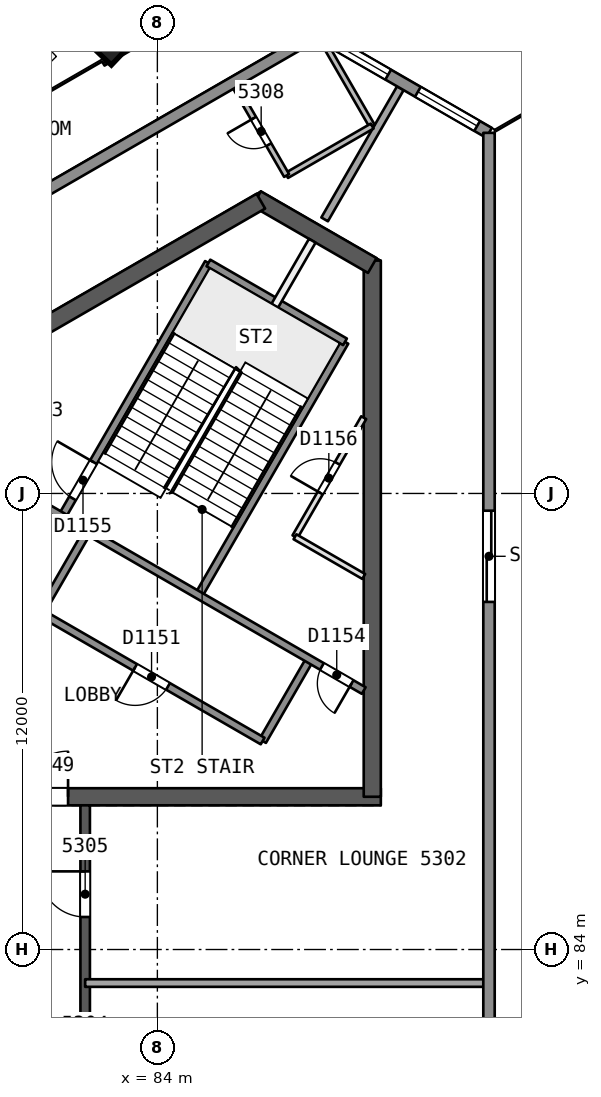
"""IFC4 building model, lengths in metres.
Left out: names, types, materials, properties, quantities, classifications, styles, units other than length and angle.
Written with IfcOpenShell. Run it as: python <this file> out.ifc"""

import sys

from ifc_helpers import new_model, si_unit, direction, frame, frame_2d, origin, origin_2d, place, context, subcontext, project, spatial, rectangle, extrude, element, fill, save


model = new_model("IFC4")
c1 = context("Model", 3, precision=1e-05, world=origin(), true_north=direction((0.0, 1.0)))
c2 = subcontext(c1, "Body", "Model", "MODEL_VIEW")
j1 = project(units=[si_unit("LENGTHUNIT", "METRE"), si_unit("PLANEANGLEUNIT", "RADIAN")], contexts=[c1])
p1 = place(None, origin())
s1 = spatial("IfcSite", under=j1, at=p1, CompositionType="ELEMENT")
p2 = place(p1, origin())
s2 = spatial("IfcBuilding", under=s1, at=p2, CompositionType="ELEMENT")
p3 = place(p2, frame((0.0, 0.0, 216.9)))
s3 = spatial("IfcBuildingStorey", under=s2, at=p3, CompositionType="ELEMENT", Elevation=216.9)
p4 = place(p3, frame((79.63, 88.019, 0.0), z_axis=(0.0, 0.0, 1.0), x_axis=(1.0, 0.0, 0.0)))
e1 = element("IfcWall", 1, at=p4, inside=s3, PredefinedType="SHEAR", context=c2, shape_type="SweptSolid", body=[
    extrude(rectangle(XDim=10.25, YDim=0.45, at=frame_2d((5.125, 0.0))), origin(), (0.0, 0.0, 1.0), 3.7),
])
p5 = place(p4, frame((0.82, 0.0, 0.0)))
e2 = element("IfcOpeningElement", 2, at=p5, cuts=e1, PredefinedType="OPENING", context=c2, shape_type="SweptSolid", body=[
    extrude(rectangle(XDim=1.2, YDim=2.1, at=frame_2d((0.6, 1.05))), frame((0.0, 0.235, 0.0), z_axis=(0.0, -1.0, 0.0), x_axis=(1.0, 0.0, 0.0)), (0.0, 0.0, 1.0), 0.471),
])
p6 = place(p3, frame((89.655, 88.019, 0.0), z_axis=(0.0, 0.0, 1.0), x_axis=(0.0, 1.0, 0.0)))
e3 = element("IfcWall", 3, at=p6, inside=s3, PredefinedType="SHEAR", context=c2, shape_type="SweptSolid", body=[
    extrude(rectangle(XDim=14.108, YDim=0.45, at=frame_2d((7.054, 0.0))), origin(), (0.0, 0.0, 1.0), 3.7),
])
p7 = place(p3, frame((89.655, 101.998, 0.0), z_axis=(0.0, 0.0, 1.0), x_axis=(-0.866042179588, 0.49997094233, 0.0)))
e4 = element("IfcWall", 4, at=p7, inside=s3, PredefinedType="SHEAR", context=c2, shape_type="SweptSolid", body=[
    extrude(rectangle(XDim=3.515, YDim=0.45, at=frame_2d((1.758, 0.0))), origin(), (0.0, 0.0, 1.0), 3.7),
])
p8 = place(p3, frame((86.723, 103.69, 0.0), z_axis=(0.0, 0.0, 1.0), x_axis=(-0.866022713978, -0.500004658852, 0.0)))
e5 = element("IfcWall", 5, at=p8, inside=s3, PredefinedType="SHEAR", context=c2, shape_type="SweptSolid", body=[
    extrude(rectangle(XDim=14.203, YDim=0.45, at=frame_2d((7.102, 0.0))), origin(), (0.0, 0.0, 1.0), 3.7),
])
p9 = place(p3, frame((82.1, 72.206, 0.0), z_axis=(0.0, 0.0, 1.0), x_axis=(0.0, 1.0, 0.0)))
e6 = element("IfcWall", 6, at=p9, inside=s3, PredefinedType="SHEAR", context=c2, shape_type="SweptSolid", body=[
    extrude(rectangle(XDim=15.588, YDim=0.25, at=frame_2d((7.794, 0.0))), origin(), (0.0, 0.0, 1.0), 3.3),
])
p10 = place(p9, frame((2.618, 0.0, 0.0)))
e7 = element("IfcOpeningElement", 7, at=p10, cuts=e6, PredefinedType="OPENING", context=c2, shape_type="SweptSolid", body=[
    extrude(rectangle(XDim=1.0, YDim=2.1, at=frame_2d((0.5, 1.05))), frame((0.0, 0.135, 0.0), z_axis=(0.0, -1.0, 0.0), x_axis=(1.0, 0.0, 0.0)), (0.0, 0.0, 1.0), 0.271),
])
p11 = place(p9, frame((7.974, 0.0, 0.0)))
e8 = element("IfcOpeningElement", 8, at=p11, cuts=e6, PredefinedType="OPENING", context=c2, shape_type="SweptSolid", body=[
    extrude(rectangle(XDim=1.2, YDim=2.4, at=frame_2d((0.6, 1.2))), frame((0.0, 0.135, 0.0), z_axis=(0.0, -1.0, 0.0), x_axis=(1.0, 0.0, 0.0)), (0.0, 0.0, 1.0), 0.271),
])
p12 = place(p9, frame((12.65, 0.0, 0.0)))
e9 = element("IfcOpeningElement", 9, at=p12, cuts=e6, PredefinedType="OPENING", context=c2, shape_type="SweptSolid", body=[
    extrude(rectangle(XDim=1.2, YDim=2.4, at=frame_2d((0.6, 1.2))), frame((0.0, 0.135, 0.0), z_axis=(0.0, -1.0, 0.0), x_axis=(1.0, 0.0, 0.0)), (0.0, 0.0, 1.0), 0.271),
])
p13 = place(p3, frame((91.743, 109.0, 0.0), z_axis=(-0.017605877014, -0.030464101799, 0.99938079409), x_axis=(0.86581098392, -0.500371202332, 2.456e-09)))
e10 = element("IfcColumn", 10, at=p13, inside=s3, PredefinedType="COLUMN", context=c2, shape_type="SweptSolid", body=[
    extrude(rectangle(XDim=1.9, YDim=1.9, at=origin_2d()), origin(), (0.0, 0.0, 1.0), 3.702),
])
p14 = place(p3, frame((82.783, 107.907, 0.0), z_axis=(-0.008375902173, -0.028161497857, 0.999568293966), x_axis=(0.865850883257, 0.499846917191, 0.021337931896)))
e11 = element("IfcColumn", 11, at=p14, inside=s3, PredefinedType="COLUMN", context=c2, shape_type="SweptSolid", body=[
    extrude(rectangle(XDim=0.85, YDim=0.85, at=origin_2d()), origin(), (0.0, 0.0, 1.0), 3.702),
])
p15 = place(p3, frame((92.578, 83.118, 0.0), z_axis=(0.0, 0.0, 1.0), x_axis=(-1.0, 0.0, 0.0)))
e12 = element("IfcWall", 12, at=p15, inside=s3, PredefinedType="PARTITIONING", context=c2, shape_type="SweptSolid", body=[
    extrude(rectangle(XDim=10.478, YDim=0.2, at=frame_2d((5.239, 0.0))), origin(), (0.0, 0.0, 1.0), 3.3),
])
p16 = place(p3, frame((90.394, 106.663, 0.0), z_axis=(0.0, 0.0, 1.0), x_axis=(-0.49999285859, -0.86602952684, 0.0)))
e13 = element("IfcWall", 13, at=p16, inside=s3, PredefinedType="PARTITIONING", context=c2, shape_type="SweptSolid", body=[
    extrude(rectangle(XDim=3.986, YDim=0.2, at=frame_2d((1.993, 0.0))), origin(), (0.0, 0.0, 1.0), 3.3),
])
p17 = place(p3, frame((88.418, 107.804, 0.0), z_axis=(0.0, 0.0, 1.0), x_axis=(0.500010657777, -0.866019250426, 0.0)))
e14 = element("IfcWall", 14, at=p17, inside=s3, PredefinedType="PARTITIONING", context=c2, shape_type="SweptSolid", body=[
    extrude(rectangle(XDim=2.469, YDim=0.15, at=frame_2d((1.234, 0.0))), origin(), (0.0, 0.0, 1.0), 3.3),
])
p18 = place(p3, frame((89.652, 105.666, 0.0), z_axis=(0.0, 0.0, 1.0), x_axis=(-0.866021400173, -0.500006934395, 0.0)))
e15 = element("IfcWall", 15, at=p18, inside=s3, PredefinedType="PARTITIONING", context=c2, shape_type="SweptSolid", body=[
    extrude(rectangle(XDim=2.6, YDim=0.15, at=frame_2d((1.3, 0.0))), origin(), (0.0, 0.0, 1.0), 3.3),
])
p19 = place(p3, frame((87.4, 104.366, 0.0), z_axis=(0.0, 0.0, 1.0), x_axis=(-0.500014634633, 0.86601695431, 0.0)))
e16 = element("IfcWall", 16, at=p19, inside=s3, PredefinedType="PARTITIONING", context=c2, shape_type="SweptSolid", body=[
    extrude(rectangle(XDim=2.676, YDim=0.15, at=frame_2d((1.338, 0.0))), origin(), (0.0, 0.0, 1.0), 3.3),
])
p20 = place(p19, frame((0.938, 0.0, 0.0)))
e17 = element("IfcOpeningElement", 17, at=p20, cuts=e16, PredefinedType="OPENING", context=c2, shape_type="SweptSolid", body=[
    extrude(rectangle(XDim=0.8, YDim=2.1, at=frame_2d((0.4, 1.05))), frame((0.0, 0.085, 0.0), z_axis=(0.0, -1.0, 0.0), x_axis=(1.0, 0.0, 0.0)), (0.0, 0.0, 1.0), 0.171),
])
p21 = place(p3, frame((88.21, 108.096, 0.0), z_axis=(0.0, 0.0, 1.0), x_axis=(0.866045268016, -0.499965592563, 0.0)))
e18 = element("IfcWall", 18, at=p21, inside=s3, PredefinedType="SOLIDWALL", context=c2, shape_type="SweptSolid", body=[
    extrude(rectangle(XDim=5.215, YDim=0.3, at=frame_2d((2.607, 0.0))), origin(), (0.0, 0.0, 1.0), 3.3),
])
p22 = place(p21, frame((3.054, 0.0, 0.9)))
e19 = element("IfcOpeningElement", 19, at=p22, cuts=e18, PredefinedType="OPENING", context=c2, shape_type="SweptSolid", body=[
    extrude(rectangle(XDim=1.8, YDim=1.5, at=frame_2d((0.9, 0.75))), frame((0.0, 0.161, 0.0), z_axis=(0.0, -1.0, 0.0), x_axis=(1.0, 0.0, 0.0)), (0.0, 0.0, 1.0), 0.321),
])
p23 = place(p21, frame((0.351, 0.0, 0.9)))
e20 = element("IfcOpeningElement", 20, at=p23, cuts=e18, PredefinedType="OPENING", context=c2, shape_type="SweptSolid", body=[
    extrude(rectangle(XDim=1.8, YDim=1.5, at=frame_2d((0.9, 0.75))), frame((0.0, 0.161, 0.0), z_axis=(0.0, -1.0, 0.0), x_axis=(1.0, 0.0, 0.0)), (0.0, 0.0, 1.0), 0.321),
])
p24 = place(p3, frame((92.727, 105.489, 0.0), z_axis=(0.0, 0.0, 1.0), x_axis=(0.0, -1.0, 0.0)))
e21 = element("IfcWall", 21, at=p24, inside=s3, PredefinedType="SOLIDWALL", context=c2, shape_type="SweptSolid", body=[
    extrude(rectangle(XDim=50.977, YDim=0.3, at=frame_2d((25.489, 0.0))), origin(), (0.0, 0.0, 1.0), 3.3),
])
p25 = place(p24, frame((9.942, 0.0, 0.0)))
e22 = element("IfcOpeningElement", 22, at=p25, cuts=e21, PredefinedType="OPENING", context=c2, shape_type="SweptSolid", body=[
    extrude(rectangle(XDim=2.4, YDim=2.4, at=frame_2d((1.2, 1.2))), frame((0.0, 0.161, 0.0), z_axis=(0.0, -1.0, 0.0), x_axis=(1.0, 0.0, 0.0)), (0.0, 0.0, 1.0), 0.321),
])
p26 = place(p24, frame((28.965, 0.0, 0.0)))
e23 = element("IfcOpeningElement", 23, at=p26, cuts=e21, PredefinedType="OPENING", context=c2, shape_type="SweptSolid", body=[
    extrude(rectangle(XDim=2.4, YDim=2.4, at=frame_2d((1.2, 1.2))), frame((0.0, 0.161, 0.0), z_axis=(0.0, -1.0, 0.0), x_axis=(1.0, 0.0, 0.0)), (0.0, 0.0, 1.0), 0.321),
])
p27 = place(p24, frame((39.656, 0.0, 0.0)))
e24 = element("IfcOpeningElement", 24, at=p27, cuts=e21, PredefinedType="OPENING", context=c2, shape_type="SweptSolid", body=[
    extrude(rectangle(XDim=2.4, YDim=2.4, at=frame_2d((1.2, 1.2))), frame((0.0, 0.161, 0.0), z_axis=(0.0, -1.0, 0.0), x_axis=(1.0, 0.0, 0.0)), (0.0, 0.0, 1.0), 0.321),
])
p28 = place(p24, frame((23.509, 0.0, 0.0)))
e25 = element("IfcOpeningElement", 25, at=p28, cuts=e21, PredefinedType="OPENING", context=c2, shape_type="SweptSolid", body=[
    extrude(rectangle(XDim=2.4, YDim=2.4, at=frame_2d((1.2, 1.2))), frame((0.0, 0.161, 0.0), z_axis=(0.0, -1.0, 0.0), x_axis=(1.0, 0.0, 0.0)), (0.0, 0.0, 1.0), 0.321),
])
p29 = place(p3, frame((44.063, 82.607, 0.0), z_axis=(0.0, 0.0, 1.0), x_axis=(0.866024402399, 0.500001734447, 0.0)))
e26 = element("IfcWall", 26, at=p29, inside=s3, PredefinedType="SOLIDWALL", context=c2, shape_type="SweptSolid", body=[
    extrude(rectangle(XDim=50.977, YDim=0.3, at=frame_2d((25.488, 0.0))), origin(), (0.0, 0.0, 1.0), 3.3),
])
p30 = place(p29, frame((24.444, 0.0, 0.0)))
e27 = element("IfcOpeningElement", 27, at=p30, cuts=e26, PredefinedType="OPENING", context=c2, shape_type="SweptSolid", body=[
    extrude(rectangle(XDim=2.4, YDim=2.4, at=frame_2d((1.2, 1.2))), frame((0.0, 0.161, 0.0), z_axis=(0.0, -1.0, 0.0), x_axis=(1.0, 0.0, 0.0)), (0.0, 0.0, 1.0), 0.321),
])
p31 = place(p29, frame((29.121, 0.0, 0.0)))
e28 = element("IfcOpeningElement", 28, at=p31, cuts=e26, PredefinedType="OPENING", context=c2, shape_type="SweptSolid", body=[
    extrude(rectangle(XDim=2.4, YDim=2.4, at=frame_2d((1.2, 1.2))), frame((0.0, 0.161, 0.0), z_axis=(0.0, -1.0, 0.0), x_axis=(1.0, 0.0, 0.0)), (0.0, 0.0, 1.0), 0.321),
])
p32 = place(p29, frame((39.656, 0.0, 0.0)))
e29 = element("IfcOpeningElement", 29, at=p32, cuts=e26, PredefinedType="OPENING", context=c2, shape_type="SweptSolid", body=[
    extrude(rectangle(XDim=2.4, YDim=2.4, at=frame_2d((1.2, 1.2))), frame((0.0, 0.161, 0.0), z_axis=(0.0, -1.0, 0.0), x_axis=(1.0, 0.0, 0.0)), (0.0, 0.0, 1.0), 0.321),
])
p33 = place(p29, frame((19.612, 0.0, 0.0)))
e30 = element("IfcOpeningElement", 30, at=p33, cuts=e26, PredefinedType="OPENING", context=c2, shape_type="SweptSolid", body=[
    extrude(rectangle(XDim=2.4, YDim=2.4, at=frame_2d((1.2, 1.2))), frame((0.0, 0.161, 0.0), z_axis=(0.0, -1.0, 0.0), x_axis=(1.0, 0.0, 0.0)), (0.0, 0.0, 1.0), 0.321),
])
p34 = place(p29, frame((8.885, 0.0, 0.0)))
e31 = element("IfcOpeningElement", 31, at=p34, cuts=e26, PredefinedType="OPENING", context=c2, shape_type="SweptSolid", body=[
    extrude(rectangle(XDim=2.4, YDim=2.4, at=frame_2d((1.2, 1.2))), frame((0.0, 0.161, 0.0), z_axis=(0.0, -1.0, 0.0), x_axis=(1.0, 0.0, 0.0)), (0.0, 0.0, 1.0), 0.321),
])
p35 = place(p3, frame((86.77, 89.486, 0.0), z_axis=(0.0, 0.0, 1.0), x_axis=(0.499961042966, 0.86604789447, 0.0)))
e32 = element("IfcWall", 32, at=p35, inside=s3, PredefinedType="SOLIDWALL", context=c2, shape_type="SweptSolid", body=[
    extrude(rectangle(XDim=2.48, YDim=0.2, at=frame_2d((1.24, 0.0))), origin(), (0.0, 0.0, 1.0), 3.3),
])
p36 = place(p3, frame((87.621, 94.86, 0.0), z_axis=(0.0, 0.0, 1.0), x_axis=(0.499993116331, 0.866029378036, 0.0)))
e33 = element("IfcWall", 33, at=p36, inside=s3, PredefinedType="PARTITIONING", context=c2, shape_type="SweptSolid", body=[
    extrude(rectangle(XDim=3.618, YDim=0.15, at=frame_2d((1.809, 0.0))), origin(), (0.0, 0.0, 1.0), 3.3),
])
p37 = place(p36, frame((1.332, 0.0, 0.0)))
e34 = element("IfcOpeningElement", 34, at=p37, cuts=e33, PredefinedType="OPENING", context=c2, shape_type="SweptSolid", body=[
    extrude(rectangle(XDim=0.9, YDim=2.1, at=frame_2d((0.45, 1.05))), frame((0.0, 0.085, 0.0), z_axis=(0.0, -1.0, 0.0), x_axis=(1.0, 0.0, 0.0)), (0.0, 0.0, 1.0), 0.171),
])
p38 = place(p3, frame((85.087, 93.321, 0.0), z_axis=(0.0, 0.0, 1.0), x_axis=(0.500019787375, 0.866013979237, 0.0)))
e35 = element("IfcWall", 35, at=p38, inside=s3, PredefinedType="SOLIDWALL", context=c2, shape_type="SweptSolid", body=[
    extrude(rectangle(XDim=7.7, YDim=0.2, at=frame_2d((3.85, 0.0))), origin(), (0.0, 0.0, 1.0), 3.3),
])
p39 = place(p3, frame((87.09, 100.94, 0.0), z_axis=(0.0, 0.0, 1.0), x_axis=(0.500011643316, 0.866018681408, 0.0)))
e36 = element("IfcWall", 36, at=p39, inside=s3, PredefinedType="PARTITIONING", context=c2, shape_type="SweptSolid", body=[
    extrude(rectangle(XDim=1.973, YDim=0.2, at=frame_2d((0.987, 0.0))), origin(), (0.0, 0.0, 1.0), 3.3),
])
p40 = place(p3, frame((80.924, 92.861, 0.0), z_axis=(0.0, 0.0, 1.0), x_axis=(0.499961042966, 0.86604789447, 0.0)))
e37 = element("IfcWall", 37, at=p40, inside=s3, PredefinedType="SOLIDWALL", context=c2, shape_type="SweptSolid", body=[
    extrude(rectangle(XDim=2.48, YDim=0.2, at=frame_2d((1.24, 0.0))), origin(), (0.0, 0.0, 1.0), 3.3),
])
p41 = place(p3, frame((81.493, 95.396, 0.0), z_axis=(0.0, 0.0, 1.0), x_axis=(0.500006057782, 0.866021906294, 0.0)))
e38 = element("IfcWall", 38, at=p41, inside=s3, PredefinedType="SOLIDWALL", context=c2, shape_type="SweptSolid", body=[
    extrude(rectangle(XDim=7.7, YDim=0.2, at=frame_2d((3.85, 0.0))), origin(), (0.0, 0.0, 1.0), 3.3),
])
p42 = place(p41, frame((0.55, 0.0, 0.0)))
e39 = element("IfcOpeningElement", 39, at=p42, cuts=e38, PredefinedType="OPENING", context=c2, shape_type="SweptSolid", body=[
    extrude(rectangle(XDim=1.1, YDim=2.1, at=frame_2d((0.55, 1.05))), frame((0.0, 0.11, 0.0), z_axis=(0.0, -1.0, 0.0), x_axis=(1.0, 0.0, 0.0)), (0.0, 0.0, 1.0), 0.221),
])
p43 = place(p3, frame((86.77, 89.486, 0.0), z_axis=(0.0, 0.0, 1.0), x_axis=(-0.86601811187, 0.500012629753, 0.0)))
e40 = element("IfcWall", 40, at=p43, inside=s3, PredefinedType="SOLIDWALL", context=c2, shape_type="SweptSolid", body=[
    extrude(rectangle(XDim=10.9, YDim=0.2, at=frame_2d((5.45, 0.0))), origin(), (0.0, 0.0, 1.0), 3.3),
])
p44 = place(p43, frame((2.875, 0.0, 0.0)))
e41 = element("IfcOpeningElement", 41, at=p44, cuts=e40, PredefinedType="OPENING", context=c2, shape_type="SweptSolid", body=[
    extrude(rectangle(XDim=1.0, YDim=2.1, at=frame_2d((0.5, 1.05))), frame((0.0, 0.11, 0.0), z_axis=(0.0, -1.0, 0.0), x_axis=(1.0, 0.0, 0.0)), (0.0, 0.0, 1.0), 0.221),
])
p45 = place(p43, frame((7.375, 0.0, 0.0)))
e42 = element("IfcOpeningElement", 42, at=p45, cuts=e40, PredefinedType="OPENING", context=c2, shape_type="SweptSolid", body=[
    extrude(rectangle(XDim=1.0, YDim=2.1, at=frame_2d((0.5, 1.05))), frame((0.0, 0.11, 0.0), z_axis=(0.0, -1.0, 0.0), x_axis=(1.0, 0.0, 0.0)), (0.0, 0.0, 1.0), 0.221),
])
p46 = place(p3, frame((89.43, 90.814, 0.0), z_axis=(0.0, 0.0, 1.0), x_axis=(-0.866018983788, 0.500011119594, 0.0)))
e43 = element("IfcWall", 43, at=p46, inside=s3, PredefinedType="SOLIDWALL", context=c2, shape_type="SweptSolid", body=[
    extrude(rectangle(XDim=10.64, YDim=0.2, at=frame_2d((5.32, 0.0))), origin(), (0.0, 0.0, 1.0), 3.3),
])
p47 = place(p46, frame((0.37, 0.0, 0.0)))
e44 = element("IfcOpeningElement", 44, at=p47, cuts=e43, PredefinedType="OPENING", context=c2, shape_type="SweptSolid", body=[
    extrude(rectangle(XDim=0.9, YDim=2.1, at=frame_2d((0.45, 1.05))), frame((0.0, 0.11, 0.0), z_axis=(0.0, -1.0, 0.0), x_axis=(1.0, 0.0, 0.0)), (0.0, 0.0, 1.0), 0.221),
])
p48 = place(p3, frame((89.43, 93.816, 0.0), z_axis=(0.0, 0.0, 1.0), x_axis=(-0.866004557827, 0.500036104519, 0.0)))
e45 = element("IfcWall", 45, at=p48, inside=s3, PredefinedType="PARTITIONING", context=c2, shape_type="SweptSolid", body=[
    extrude(rectangle(XDim=2.089, YDim=0.15, at=frame_2d((1.044, 0.0))), origin(), (0.0, 0.0, 1.0), 3.3),
])
p49 = place(p3, frame((88.937, 99.99, 0.0), z_axis=(0.0, 0.0, 1.0), x_axis=(-0.866004344652, 0.500036473714, 0.0)))
e46 = element("IfcWall", 46, at=p49, inside=s3, PredefinedType="SOLIDWALL", context=c2, shape_type="SweptSolid", body=[
    extrude(rectangle(XDim=4.15, YDim=0.2, at=frame_2d((2.075, 0.0))), origin(), (0.0, 0.0, 1.0), 3.3),
])
p50 = place(p12, origin())
e47 = element("IfcDoor", 47, at=p50, inside=s3, OperationType="SINGLE_SWING_RIGHT", PredefinedType="NOTDEFINED", context=c2, shape_type="SweptSolid", body=[
    extrude(rectangle(XDim=1.2, YDim=2.4, at=frame_2d((0.6, 1.2))), frame((0.0, 0.025, 0.0), z_axis=(0.0, -1.0, 0.0), x_axis=(1.0, 0.0, 0.0)), (0.0, 0.0, 1.0), 0.05),
])
fill(e9, e47)
p51 = place(p20, origin())
e48 = element("IfcDoor", 48, at=p51, inside=s3, OperationType="SINGLE_SWING_RIGHT", PredefinedType="NOTDEFINED", context=c2, shape_type="SweptSolid", body=[
    extrude(rectangle(XDim=0.8, YDim=2.1, at=frame_2d((0.4, 1.05))), frame((0.0, 0.025, 0.0), z_axis=(0.0, -1.0, 0.0), x_axis=(1.0, 0.0, 0.0)), (0.0, 0.0, 1.0), 0.05),
])
fill(e17, e48)
p52 = place(p22, origin())
e49 = element("IfcWindow", 49, at=p52, inside=s3, PartitioningType="SINGLE_PANEL", PredefinedType="WINDOW", context=c2, shape_type="SweptSolid", body=[
    extrude(rectangle(XDim=1.8, YDim=1.5, at=frame_2d((0.9, 0.75))), frame((0.0, 0.03, 0.0), z_axis=(0.0, -1.0, 0.0), x_axis=(1.0, 0.0, 0.0)), (0.0, 0.0, 1.0), 0.06),
])
fill(e19, e49)
p53 = place(p23, origin())
e50 = element("IfcWindow", 50, at=p53, inside=s3, PartitioningType="SINGLE_PANEL", PredefinedType="WINDOW", context=c2, shape_type="SweptSolid", body=[
    extrude(rectangle(XDim=1.8, YDim=1.5, at=frame_2d((0.9, 0.75))), frame((0.0, 0.03, 0.0), z_axis=(0.0, -1.0, 0.0), x_axis=(1.0, 0.0, 0.0)), (0.0, 0.0, 1.0), 0.06),
])
fill(e20, e50)
p54 = place(p25, origin())
e51 = element("IfcDoor", 51, at=p54, inside=s3, OperationType="SLIDING_TO_LEFT", PredefinedType="NOTDEFINED", context=c2, shape_type="SweptSolid", body=[
    extrude(rectangle(XDim=2.4, YDim=2.4, at=frame_2d((1.2, 1.2))), frame((0.0, 0.025, 0.0), z_axis=(0.0, -1.0, 0.0), x_axis=(1.0, 0.0, 0.0)), (0.0, 0.0, 1.0), 0.05),
])
fill(e22, e51)
p55 = place(p5, origin())
e52 = element("IfcDoor", 52, at=p55, inside=s3, OperationType="SINGLE_SWING_RIGHT", PredefinedType="NOTDEFINED", context=c2, shape_type="SweptSolid", body=[
    extrude(rectangle(XDim=1.2, YDim=2.1, at=frame_2d((0.6, 1.05))), frame((0.0, 0.025, 0.0), z_axis=(0.0, -1.0, 0.0), x_axis=(1.0, 0.0, 0.0)), (0.0, 0.0, 1.0), 0.05),
])
fill(e2, e52)
p56 = place(p44, origin())
e53 = element("IfcDoor", 53, at=p56, inside=s3, OperationType="SINGLE_SWING_RIGHT", PredefinedType="NOTDEFINED", context=c2, shape_type="SweptSolid", body=[
    extrude(rectangle(XDim=1.0, YDim=2.1, at=frame_2d((0.5, 1.05))), frame((0.0, 0.025, 0.0), z_axis=(0.0, -1.0, 0.0), x_axis=(1.0, 0.0, 0.0)), (0.0, 0.0, 1.0), 0.05),
])
fill(e41, e53)
p57 = place(p47, origin())
e54 = element("IfcDoor", 54, at=p57, inside=s3, OperationType="SINGLE_SWING_LEFT", PredefinedType="NOTDEFINED", context=c2, shape_type="SweptSolid", body=[
    extrude(rectangle(XDim=0.9, YDim=2.1, at=frame_2d((0.45, 1.05))), frame((0.0, 0.025, 0.0), z_axis=(0.0, -1.0, 0.0), x_axis=(1.0, 0.0, 0.0)), (0.0, 0.0, 1.0), 0.05),
])
fill(e44, e54)
p58 = place(p42, origin())
e55 = element("IfcDoor", 55, at=p58, inside=s3, OperationType="SINGLE_SWING_RIGHT", PredefinedType="NOTDEFINED", context=c2, shape_type="SweptSolid", body=[
    extrude(rectangle(XDim=1.1, YDim=2.1, at=frame_2d((0.55, 1.05))), frame((0.0, 0.025, 0.0), z_axis=(0.0, -1.0, 0.0), x_axis=(1.0, 0.0, 0.0)), (0.0, 0.0, 1.0), 0.05),
])
fill(e39, e55)
p59 = place(p37, origin())
e56 = element("IfcDoor", 56, at=p59, inside=s3, OperationType="SINGLE_SWING_LEFT", PredefinedType="NOTDEFINED", context=c2, shape_type="SweptSolid", body=[
    extrude(rectangle(XDim=0.9, YDim=2.1, at=frame_2d((0.45, 1.05))), frame((0.0, 0.025, 0.0), z_axis=(0.0, -1.0, 0.0), x_axis=(1.0, 0.0, 0.0)), (0.0, 0.0, 1.0), 0.05),
])
fill(e34, e56)
save(model, sys.argv[1])
